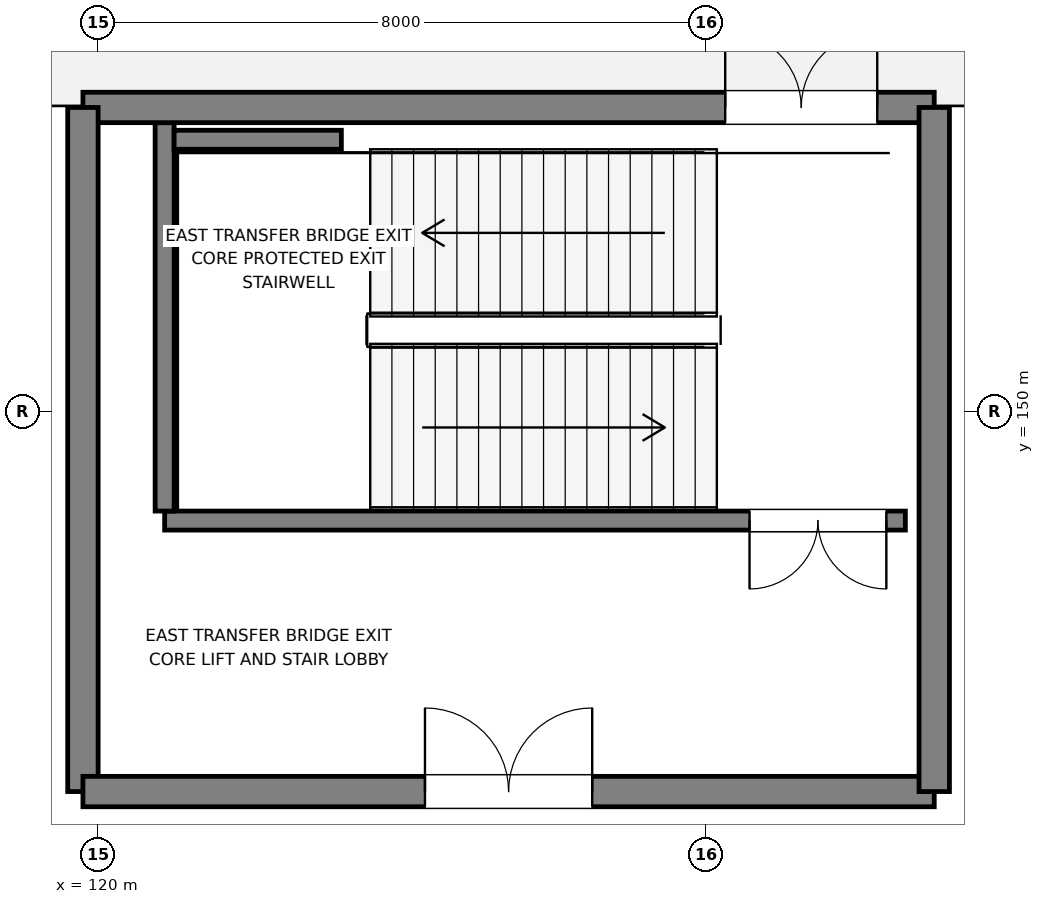
"""IFC4 building model, lengths in metres.
Left out: names, types, materials, properties, quantities, classifications, styles, units other than length and angle.
Written with IfcOpenShell. Run it as: python <this file> out.ifc"""

import sys

from ifc_helpers import new_model, si_unit, direction, frame, frame_2d, origin, place, context, subcontext, project, spatial, rectangle, extrude, element, fill, save


model = new_model("IFC4")
c1 = context("Model", 3, precision=1e-05, world=origin(), true_north=direction((0.0, 1.0)))
c2 = subcontext(c1, "Body", "Model", "MODEL_VIEW")
j1 = project(units=[si_unit("LENGTHUNIT", "METRE"), si_unit("PLANEANGLEUNIT", "RADIAN")], contexts=[c1])
p1 = place(None, origin())
s1 = spatial("IfcSite", under=j1, at=p1, CompositionType="ELEMENT")
p2 = place(p1, origin())
s2 = spatial("IfcBuilding", under=s1, at=p2, CompositionType="ELEMENT")
p3 = place(p2, origin())
s3 = spatial("IfcBuildingStorey", under=s2, at=p3, CompositionType="ELEMENT", Elevation=0.0)
p4 = place(p3, frame((130.62, 148.565, 0.0), z_axis=(0.0, 0.0, 1.0), x_axis=(-1.0, 0.0, 0.0)))
e1 = element("IfcWall", 1, at=p4, inside=s3, PredefinedType="SOLIDWALL", context=c2, shape_type="SweptSolid", body=[
    extrude(rectangle(XDim=9.745, YDim=0.25, at=frame_2d((4.872, 0.0))), origin(), (0.0, 0.0, 1.0), 5.62),
])
p5 = place(p4, frame((0.25, 0.0, 0.0)))
e2 = element("IfcOpeningElement", 2, at=p5, cuts=e1, PredefinedType="OPENING", context=c2, shape_type="SweptSolid", body=[
    extrude(rectangle(XDim=1.8, YDim=2.25, at=frame_2d((0.9, 1.125))), frame((0.0, 0.135, 0.0), z_axis=(0.0, -1.0, 0.0), x_axis=(1.0, 0.0, 0.0)), (0.0, 0.0, 1.0), 0.27),
])
p6 = place(p3, frame((120.875, 153.8, 0.0), z_axis=(0.0, 0.0, 1.0), x_axis=(0.0, -1.0, 0.0)))
e3 = element("IfcWall", 3, at=p6, inside=s3, PredefinedType="SOLIDWALL", context=c2, shape_type="SweptSolid", body=[
    extrude(rectangle(XDim=5.11, YDim=0.25, at=frame_2d((2.555, 0.0))), origin(), (0.0, 0.0, 1.0), 5.62),
])
p7 = place(p3, frame((123.2, 153.575, 0.0), z_axis=(0.0, 0.0, 1.0), x_axis=(-1.0, 0.0, 0.0)))
e4 = element("IfcWall", 4, at=p7, inside=s3, PredefinedType="SOLIDWALL", context=c2, shape_type="SweptSolid", body=[
    extrude(rectangle(XDim=2.2, YDim=0.25, at=frame_2d((1.1, 0.0))), origin(), (0.0, 0.0, 1.0), 5.62),
])
p8 = place(p3, frame((131.0, 154.0, 0.0), z_axis=(0.0, 0.0, 1.0), x_axis=(-1.0, 0.0, 0.0)))
e5 = element("IfcWall", 5, at=p8, inside=s3, PredefinedType="SHEAR", context=c2, shape_type="SweptSolid", body=[
    extrude(rectangle(XDim=11.2, YDim=0.4, at=frame_2d((5.6, 0.0))), origin(), (0.0, 0.0, 1.0), 5.64),
])
p9 = place(p8, frame((0.75, 0.0, 0.0)))
e6 = element("IfcOpeningElement", 6, at=p9, cuts=e5, PredefinedType="OPENING", context=c2, shape_type="SweptSolid", body=[
    extrude(rectangle(XDim=2.0, YDim=2.4, at=frame_2d((1.0, 1.2))), frame((0.0, 0.21, 0.0), z_axis=(0.0, -1.0, 0.0), x_axis=(1.0, 0.0, 0.0)), (0.0, 0.0, 1.0), 0.42),
])
p10 = place(p3, frame((119.8, 154.0, 0.0), z_axis=(0.0, 0.0, 1.0), x_axis=(0.0, -1.0, 0.0)))
e7 = element("IfcWall", 7, at=p10, inside=s3, PredefinedType="SHEAR", context=c2, shape_type="SweptSolid", body=[
    extrude(rectangle(XDim=9.0, YDim=0.4, at=frame_2d((4.5, 0.0))), origin(), (0.0, 0.0, 1.0), 5.64),
])
p11 = place(p3, frame((119.8, 145.0, 0.0), z_axis=(0.0, 0.0, 1.0), x_axis=(1.0, 0.0, 0.0)))
e8 = element("IfcWall", 8, at=p11, inside=s3, PredefinedType="SHEAR", context=c2, shape_type="SweptSolid", body=[
    extrude(rectangle(XDim=11.2, YDim=0.4, at=frame_2d((5.6, 0.0))), origin(), (0.0, 0.0, 1.0), 5.64),
])
p12 = place(p11, frame((4.5, 0.0, 0.0)))
e9 = element("IfcOpeningElement", 9, at=p12, cuts=e8, PredefinedType="OPENING", context=c2, shape_type="SweptSolid", body=[
    extrude(rectangle(XDim=2.2, YDim=2.3, at=frame_2d((1.1, 1.15))), frame((0.0, 0.21, 0.0), z_axis=(0.0, -1.0, 0.0), x_axis=(1.0, 0.0, 0.0)), (0.0, 0.0, 1.0), 0.42),
])
p13 = place(p3, frame((131.0, 145.0, 0.0), z_axis=(0.0, 0.0, 1.0), x_axis=(0.0, 1.0, 0.0)))
e10 = element("IfcWall", 10, at=p13, inside=s3, PredefinedType="SHEAR", context=c2, shape_type="SweptSolid", body=[
    extrude(rectangle(XDim=9.0, YDim=0.4, at=frame_2d((4.5, 0.0))), origin(), (0.0, 0.0, 1.0), 5.64),
])
p14 = place(p5, origin())
e11 = element("IfcDoor", 11, at=p14, inside=s3, OperationType="DOUBLE_DOOR_SINGLE_SWING", PredefinedType="DOOR", context=c2, shape_type="SweptSolid", body=[
    extrude(rectangle(XDim=1.8, YDim=2.25, at=frame_2d((0.9, 1.125))), frame((0.0, 0.025, 0.0), z_axis=(0.0, -1.0, 0.0), x_axis=(1.0, 0.0, 0.0)), (0.0, 0.0, 1.0), 0.05),
])
fill(e2, e11)
p15 = place(p9, frame((2.0, 0.0, 0.0), z_axis=(0.0, 0.0, 1.0), x_axis=(-1.0, 0.0, 0.0)))
e12 = element("IfcDoor", 12, at=p15, inside=s3, OperationType="DOUBLE_DOOR_SINGLE_SWING", PredefinedType="DOOR", context=c2, shape_type="SweptSolid", body=[
    extrude(rectangle(XDim=2.0, YDim=2.4, at=frame_2d((1.0, 1.2))), frame((0.0, 0.025, 0.0), z_axis=(0.0, -1.0, 0.0), x_axis=(1.0, 0.0, 0.0)), (0.0, 0.0, 1.0), 0.05),
])
fill(e6, e12)
p16 = place(p12, origin())
e13 = element("IfcDoor", 13, at=p16, inside=s3, OperationType="DOUBLE_DOOR_SINGLE_SWING", PredefinedType="DOOR", context=c2, shape_type="SweptSolid", body=[
    extrude(rectangle(XDim=2.2, YDim=2.3, at=frame_2d((1.1, 1.15))), frame((0.0, 0.025, 0.0), z_axis=(0.0, -1.0, 0.0), x_axis=(1.0, 0.0, 0.0)), (0.0, 0.0, 1.0), 0.05),
])
fill(e9, e13)
save(model, sys.argv[1])
